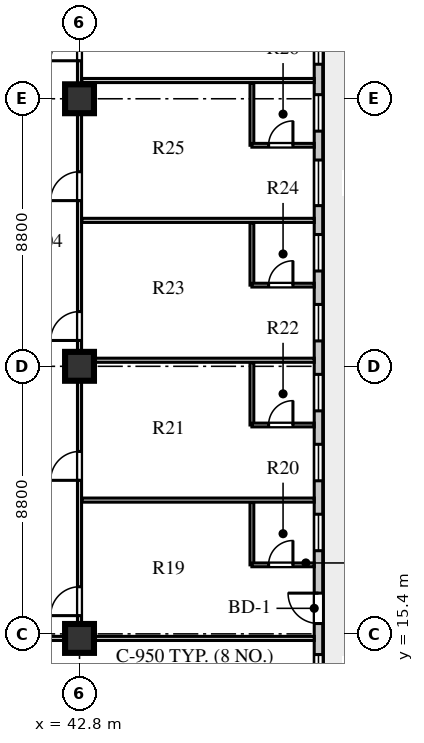
"""IFC4 building model, lengths in metres.
Left out: names, types, materials, properties, quantities, classifications, styles, units other than length and angle.
Written with IfcOpenShell. Run it as: python <this file> out.ifc"""

import sys

from ifc_helpers import new_model, si_unit, direction, frame, frame_2d, origin, origin_2d, place, context, subcontext, project, spatial, rectangle, extrude, element, fill, save


model = new_model("IFC4")
c1 = context("Model", 3, precision=1e-05, world=origin(), true_north=direction((0.0, 1.0)))
c2 = subcontext(c1, "Body", "Model", "MODEL_VIEW")
j1 = project(units=[si_unit("LENGTHUNIT", "METRE"), si_unit("PLANEANGLEUNIT", "RADIAN")], contexts=[c1])
p1 = place(None, origin())
s1 = spatial("IfcSite", under=j1, at=p1, CompositionType="ELEMENT")
p2 = place(p1, origin())
s2 = spatial("IfcBuilding", under=s1, at=p2, CompositionType="ELEMENT")
p3 = place(p2, frame((0.0, 0.0, 188.7)))
s3 = spatial("IfcBuildingStorey", under=s2, at=p3, CompositionType="ELEMENT", Elevation=188.7)
for number, where, z_axis, x_axis in (
    (1, (42.8, 15.25, 0.0), (0.0, 0.0, 1.0), (1.0, 0.0, 0.0)),
    (2, (42.8, 24.2, 0.0), (0.0, 0.0, 1.0), (1.0, 0.0, 0.0)),
    (3, (42.8, 33.0, 0.0), (0.0, 0.0, 1.0), (1.0, 0.0, 0.0)),
):
    element("IfcColumn", number, at=place(p3, frame(where, z_axis=z_axis, x_axis=x_axis)), inside=s3, PredefinedType="COLUMN", context=c2, shape_type="SweptSolid", body=[
        extrude(rectangle(XDim=0.95, YDim=0.95, at=origin_2d()), origin(), (0.0, 0.0, 1.0), 3.6),
    ])
p4 = place(p3, frame((50.66, 13.13, 0.0), z_axis=(0.0, 0.0, 1.0), x_axis=(0.0, 1.0, 0.0)))
e4 = element("IfcWall", 4, at=p4, inside=s3, PredefinedType="STANDARD", context=c2, shape_type="SweptSolid", body=[
    extrude(rectangle(XDim=30.94, YDim=0.28, at=frame_2d((15.47, 0.0))), origin(), (0.0, 0.0, 1.0), 3.6),
])
p5 = place(p4, frame((0.64, 0.0, 0.8)))
e5 = element("IfcOpeningElement", 5, at=p5, cuts=e4, PredefinedType="OPENING", context=c2, shape_type="SweptSolid", body=[
    extrude(rectangle(XDim=0.95, YDim=1.65, at=frame_2d((0.475, 0.825))), frame((0.0, 0.15, 0.0), z_axis=(0.0, -1.0, 0.0), x_axis=(1.0, 0.0, 0.0)), (0.0, 0.0, 1.0), 0.3),
])
p6 = place(p4, frame((2.61, 0.0, 0.0)))
e6 = element("IfcOpeningElement", 6, at=p6, cuts=e4, PredefinedType="OPENING", context=c2, shape_type="SweptSolid", body=[
    extrude(rectangle(XDim=1.0, YDim=2.05, at=frame_2d((0.5, 1.025))), frame((0.0, 0.15, 0.0), z_axis=(0.0, -1.0, 0.0), x_axis=(1.0, 0.0, 0.0)), (0.0, 0.0, 1.0), 0.3),
])
p7 = place(p4, frame((5.005, 0.0, 0.8)))
e7 = element("IfcOpeningElement", 7, at=p7, cuts=e4, PredefinedType="OPENING", context=c2, shape_type="SweptSolid", body=[
    extrude(rectangle(XDim=1.2, YDim=1.75, at=frame_2d((0.6, 0.875))), frame((0.0, 0.15, 0.0), z_axis=(0.0, -1.0, 0.0), x_axis=(1.0, 0.0, 0.0)), (0.0, 0.0, 1.0), 0.3),
])
p8 = place(p4, frame((7.305, 0.0, 0.8)))
e8 = element("IfcOpeningElement", 8, at=p8, cuts=e4, PredefinedType="OPENING", context=c2, shape_type="SweptSolid", body=[
    extrude(rectangle(XDim=1.2, YDim=1.75, at=frame_2d((0.6, 0.875))), frame((0.0, 0.15, 0.0), z_axis=(0.0, -1.0, 0.0), x_axis=(1.0, 0.0, 0.0)), (0.0, 0.0, 1.0), 0.3),
])
p9 = place(p4, frame((9.605, 0.0, 0.8)))
e9 = element("IfcOpeningElement", 9, at=p9, cuts=e4, PredefinedType="OPENING", context=c2, shape_type="SweptSolid", body=[
    extrude(rectangle(XDim=1.2, YDim=1.75, at=frame_2d((0.6, 0.875))), frame((0.0, 0.15, 0.0), z_axis=(0.0, -1.0, 0.0), x_axis=(1.0, 0.0, 0.0)), (0.0, 0.0, 1.0), 0.3),
])
p10 = place(p4, frame((11.905, 0.0, 0.8)))
e10 = element("IfcOpeningElement", 10, at=p10, cuts=e4, PredefinedType="OPENING", context=c2, shape_type="SweptSolid", body=[
    extrude(rectangle(XDim=1.2, YDim=1.75, at=frame_2d((0.6, 0.875))), frame((0.0, 0.15, 0.0), z_axis=(0.0, -1.0, 0.0), x_axis=(1.0, 0.0, 0.0)), (0.0, 0.0, 1.0), 0.3),
])
p11 = place(p4, frame((14.205, 0.0, 0.8)))
e11 = element("IfcOpeningElement", 11, at=p11, cuts=e4, PredefinedType="OPENING", context=c2, shape_type="SweptSolid", body=[
    extrude(rectangle(XDim=1.2, YDim=1.75, at=frame_2d((0.6, 0.875))), frame((0.0, 0.15, 0.0), z_axis=(0.0, -1.0, 0.0), x_axis=(1.0, 0.0, 0.0)), (0.0, 0.0, 1.0), 0.3),
])
p12 = place(p4, frame((16.355, 0.0, 0.8)))
e12 = element("IfcOpeningElement", 12, at=p12, cuts=e4, PredefinedType="OPENING", context=c2, shape_type="SweptSolid", body=[
    extrude(rectangle(XDim=1.5, YDim=2.0, at=frame_2d((0.75, 1.0))), frame((0.0, 0.15, 0.0), z_axis=(0.0, -1.0, 0.0), x_axis=(1.0, 0.0, 0.0)), (0.0, 0.0, 1.0), 0.3),
])
p13 = place(p4, frame((18.805, 0.0, 0.8)))
e13 = element("IfcOpeningElement", 13, at=p13, cuts=e4, PredefinedType="OPENING", context=c2, shape_type="SweptSolid", body=[
    extrude(rectangle(XDim=1.2, YDim=1.75, at=frame_2d((0.6, 0.875))), frame((0.0, 0.15, 0.0), z_axis=(0.0, -1.0, 0.0), x_axis=(1.0, 0.0, 0.0)), (0.0, 0.0, 1.0), 0.3),
])
p14 = place(p4, frame((21.005, 0.0, 0.8)))
e14 = element("IfcOpeningElement", 14, at=p14, cuts=e4, PredefinedType="OPENING", context=c2, shape_type="SweptSolid", body=[
    extrude(rectangle(XDim=1.2, YDim=1.75, at=frame_2d((0.6, 0.875))), frame((0.0, 0.15, 0.0), z_axis=(0.0, -1.0, 0.0), x_axis=(1.0, 0.0, 0.0)), (0.0, 0.0, 1.0), 0.3),
])
p15 = place(p4, frame((23.205, 0.0, 0.8)))
e15 = element("IfcOpeningElement", 15, at=p15, cuts=e4, PredefinedType="OPENING", context=c2, shape_type="SweptSolid", body=[
    extrude(rectangle(XDim=1.2, YDim=1.75, at=frame_2d((0.6, 0.875))), frame((0.0, 0.15, 0.0), z_axis=(0.0, -1.0, 0.0), x_axis=(1.0, 0.0, 0.0)), (0.0, 0.0, 1.0), 0.3),
])
p16 = place(p4, frame((27.105, 0.0, 0.8)))
e16 = element("IfcOpeningElement", 16, at=p16, cuts=e4, PredefinedType="OPENING", context=c2, shape_type="SweptSolid", body=[
    extrude(rectangle(XDim=1.2, YDim=1.75, at=frame_2d((0.6, 0.875))), frame((0.0, 0.15, 0.0), z_axis=(0.0, -1.0, 0.0), x_axis=(1.0, 0.0, 0.0)), (0.0, 0.0, 1.0), 0.3),
])
p17 = place(p4, frame((29.35, 0.0, 0.8)))
e17 = element("IfcOpeningElement", 17, at=p17, cuts=e4, PredefinedType="OPENING", context=c2, shape_type="SweptSolid", body=[
    extrude(rectangle(XDim=0.95, YDim=1.65, at=frame_2d((0.475, 0.825))), frame((0.0, 0.15, 0.0), z_axis=(0.0, -1.0, 0.0), x_axis=(1.0, 0.0, 0.0)), (0.0, 0.0, 1.0), 0.3),
])
p18 = place(p3, frame((42.8, 15.25, 0.0), z_axis=(0.0, 0.0, 1.0), x_axis=(0.0, 1.0, 0.0)))
e18 = element("IfcWall", 18, at=p18, inside=s3, PredefinedType="PARTITIONING", context=c2, shape_type="SweptSolid", body=[
    extrude(rectangle(XDim=26.7, YDim=0.135, at=frame_2d((13.35, 0.0))), origin(), (0.0, 0.0, 1.0), 2.95),
])
p19 = place(p18, frame((0.75, 0.0, 0.0)))
e19 = element("IfcOpeningElement", 19, at=p19, cuts=e18, PredefinedType="OPENING", context=c2, shape_type="SweptSolid", body=[
    extrude(rectangle(XDim=0.95, YDim=2.1, at=frame_2d((0.475, 1.05))), frame((0.0, 0.078, 0.0), z_axis=(0.0, -1.0, 0.0), x_axis=(1.0, 0.0, 0.0)), (0.0, 0.0, 1.0), 0.155),
])
p20 = place(p18, frame((5.2, 0.0, 0.0)))
e20 = element("IfcOpeningElement", 20, at=p20, cuts=e18, PredefinedType="OPENING", context=c2, shape_type="SweptSolid", body=[
    extrude(rectangle(XDim=0.95, YDim=2.1, at=frame_2d((0.475, 1.05))), frame((0.0, 0.078, 0.0), z_axis=(0.0, -1.0, 0.0), x_axis=(1.0, 0.0, 0.0)), (0.0, 0.0, 1.0), 0.155),
])
p21 = place(p18, frame((9.8, 0.0, 0.0)))
e21 = element("IfcOpeningElement", 21, at=p21, cuts=e18, PredefinedType="OPENING", context=c2, shape_type="SweptSolid", body=[
    extrude(rectangle(XDim=0.95, YDim=2.1, at=frame_2d((0.475, 1.05))), frame((0.0, 0.078, 0.0), z_axis=(0.0, -1.0, 0.0), x_axis=(1.0, 0.0, 0.0)), (0.0, 0.0, 1.0), 0.155),
])
p22 = place(p18, frame((14.4, 0.0, 0.0)))
e22 = element("IfcOpeningElement", 22, at=p22, cuts=e18, PredefinedType="OPENING", context=c2, shape_type="SweptSolid", body=[
    extrude(rectangle(XDim=0.95, YDim=2.1, at=frame_2d((0.475, 1.05))), frame((0.0, 0.078, 0.0), z_axis=(0.0, -1.0, 0.0), x_axis=(1.0, 0.0, 0.0)), (0.0, 0.0, 1.0), 0.155),
])
p23 = place(p18, frame((19.0, 0.0, 0.0)))
e23 = element("IfcOpeningElement", 23, at=p23, cuts=e18, PredefinedType="OPENING", context=c2, shape_type="SweptSolid", body=[
    extrude(rectangle(XDim=0.95, YDim=2.1, at=frame_2d((0.475, 1.05))), frame((0.0, 0.078, 0.0), z_axis=(0.0, -1.0, 0.0), x_axis=(1.0, 0.0, 0.0)), (0.0, 0.0, 1.0), 0.155),
])
p24 = place(p18, frame((23.4, 0.0, 0.0)))
e24 = element("IfcOpeningElement", 24, at=p24, cuts=e18, PredefinedType="OPENING", context=c2, shape_type="SweptSolid", body=[
    extrude(rectangle(XDim=0.95, YDim=2.1, at=frame_2d((0.475, 1.05))), frame((0.0, 0.078, 0.0), z_axis=(0.0, -1.0, 0.0), x_axis=(1.0, 0.0, 0.0)), (0.0, 0.0, 1.0), 0.155),
])
p25 = place(p3, frame((40.82, 15.25, 0.0), z_axis=(0.0, 0.0, 1.0), x_axis=(1.0, 0.0, 0.0)))
e25 = element("IfcWall", 25, at=p25, inside=s3, PredefinedType="PARTITIONING", context=c2, shape_type="SweptSolid", body=[
    extrude(rectangle(XDim=9.7, YDim=0.135, at=frame_2d((4.85, 0.0))), origin(), (0.0, 0.0, 1.0), 2.95),
])
p26 = place(p3, frame((48.47, 17.67, 0.0), z_axis=(0.0, 0.0, 1.0), x_axis=(0.0, 1.0, 0.0)))
e26 = element("IfcWall", 26, at=p26, inside=s3, PredefinedType="PLUMBINGWALL", context=c2, shape_type="SweptSolid", body=[
    extrude(rectangle(XDim=2.05, YDim=0.125, at=frame_2d((1.025, 0.0))), origin(), (0.0, 0.0, 1.0), 3.6),
])
p27 = place(p3, frame((48.47, 17.67, 0.0), z_axis=(0.0, 0.0, 1.0), x_axis=(1.0, 0.0, 0.0)))
e27 = element("IfcWall", 27, at=p27, inside=s3, PredefinedType="PLUMBINGWALL", context=c2, shape_type="SweptSolid", body=[
    extrude(rectangle(XDim=2.05, YDim=0.125, at=frame_2d((1.025, 0.0))), origin(), (0.0, 0.0, 1.0), 3.6),
])
p28 = place(p27, frame((0.55, 0.0, 0.0)))
e28 = element("IfcOpeningElement", 28, at=p28, cuts=e27, PredefinedType="OPENING", context=c2, shape_type="SweptSolid", body=[
    extrude(rectangle(XDim=0.8, YDim=2.05, at=frame_2d((0.4, 1.025))), frame((0.0, 0.073, 0.0), z_axis=(0.0, -1.0, 0.0), x_axis=(1.0, 0.0, 0.0)), (0.0, 0.0, 1.0), 0.145),
])
p29 = place(p3, frame((42.88, 19.8, 0.0), z_axis=(0.0, 0.0, 1.0), x_axis=(1.0, 0.0, 0.0)))
e29 = element("IfcWall", 29, at=p29, inside=s3, PredefinedType="PARTITIONING", context=c2, shape_type="SweptSolid", body=[
    extrude(rectangle(XDim=7.64, YDim=0.135, at=frame_2d((3.82, 0.0))), origin(), (0.0, 0.0, 1.0), 3.6),
])
p30 = place(p3, frame((48.47, 22.27, 0.0), z_axis=(0.0, 0.0, 1.0), x_axis=(0.0, 1.0, 0.0)))
e30 = element("IfcWall", 30, at=p30, inside=s3, PredefinedType="PLUMBINGWALL", context=c2, shape_type="SweptSolid", body=[
    extrude(rectangle(XDim=2.05, YDim=0.125, at=frame_2d((1.025, 0.0))), origin(), (0.0, 0.0, 1.0), 3.6),
])
p31 = place(p3, frame((48.47, 22.27, 0.0), z_axis=(0.0, 0.0, 1.0), x_axis=(1.0, 0.0, 0.0)))
e31 = element("IfcWall", 31, at=p31, inside=s3, PredefinedType="PLUMBINGWALL", context=c2, shape_type="SweptSolid", body=[
    extrude(rectangle(XDim=2.05, YDim=0.125, at=frame_2d((1.025, 0.0))), origin(), (0.0, 0.0, 1.0), 3.6),
])
p32 = place(p31, frame((0.55, 0.0, 0.0)))
e32 = element("IfcOpeningElement", 32, at=p32, cuts=e31, PredefinedType="OPENING", context=c2, shape_type="SweptSolid", body=[
    extrude(rectangle(XDim=0.8, YDim=2.05, at=frame_2d((0.4, 1.025))), frame((0.0, 0.073, 0.0), z_axis=(0.0, -1.0, 0.0), x_axis=(1.0, 0.0, 0.0)), (0.0, 0.0, 1.0), 0.145),
])
p33 = place(p3, frame((42.88, 24.4, 0.0), z_axis=(0.0, 0.0, 1.0), x_axis=(1.0, 0.0, 0.0)))
e33 = element("IfcWall", 33, at=p33, inside=s3, PredefinedType="PARTITIONING", context=c2, shape_type="SweptSolid", body=[
    extrude(rectangle(XDim=7.64, YDim=0.135, at=frame_2d((3.82, 0.0))), origin(), (0.0, 0.0, 1.0), 3.15),
])
p34 = place(p3, frame((48.47, 26.87, 0.0), z_axis=(0.0, 0.0, 1.0), x_axis=(0.0, 1.0, 0.0)))
e34 = element("IfcWall", 34, at=p34, inside=s3, PredefinedType="PLUMBINGWALL", context=c2, shape_type="SweptSolid", body=[
    extrude(rectangle(XDim=2.05, YDim=0.125, at=frame_2d((1.025, 0.0))), origin(), (0.0, 0.0, 1.0), 3.6),
])
p35 = place(p3, frame((48.47, 26.87, 0.0), z_axis=(0.0, 0.0, 1.0), x_axis=(1.0, 0.0, 0.0)))
e35 = element("IfcWall", 35, at=p35, inside=s3, PredefinedType="PLUMBINGWALL", context=c2, shape_type="SweptSolid", body=[
    extrude(rectangle(XDim=2.05, YDim=0.125, at=frame_2d((1.025, 0.0))), origin(), (0.0, 0.0, 1.0), 3.6),
])
p36 = place(p35, frame((0.55, 0.0, 0.0)))
e36 = element("IfcOpeningElement", 36, at=p36, cuts=e35, PredefinedType="OPENING", context=c2, shape_type="SweptSolid", body=[
    extrude(rectangle(XDim=0.8, YDim=2.05, at=frame_2d((0.4, 1.025))), frame((0.0, 0.073, 0.0), z_axis=(0.0, -1.0, 0.0), x_axis=(1.0, 0.0, 0.0)), (0.0, 0.0, 1.0), 0.145),
])
p37 = place(p3, frame((42.88, 29.0, 0.0), z_axis=(0.0, 0.0, 1.0), x_axis=(1.0, 0.0, 0.0)))
e37 = element("IfcWall", 37, at=p37, inside=s3, PredefinedType="PARTITIONING", context=c2, shape_type="SweptSolid", body=[
    extrude(rectangle(XDim=7.64, YDim=0.135, at=frame_2d((3.82, 0.0))), origin(), (0.0, 0.0, 1.0), 3.6),
])
p38 = place(p3, frame((48.47, 31.47, 0.0), z_axis=(0.0, 0.0, 1.0), x_axis=(0.0, 1.0, 0.0)))
e38 = element("IfcWall", 38, at=p38, inside=s3, PredefinedType="PLUMBINGWALL", context=c2, shape_type="SweptSolid", body=[
    extrude(rectangle(XDim=2.05, YDim=0.125, at=frame_2d((1.025, 0.0))), origin(), (0.0, 0.0, 1.0), 3.6),
])
p39 = place(p3, frame((48.47, 31.47, 0.0), z_axis=(0.0, 0.0, 1.0), x_axis=(1.0, 0.0, 0.0)))
e39 = element("IfcWall", 39, at=p39, inside=s3, PredefinedType="PLUMBINGWALL", context=c2, shape_type="SweptSolid", body=[
    extrude(rectangle(XDim=2.05, YDim=0.125, at=frame_2d((1.025, 0.0))), origin(), (0.0, 0.0, 1.0), 3.6),
])
p40 = place(p39, frame((0.55, 0.0, 0.0)))
e40 = element("IfcOpeningElement", 40, at=p40, cuts=e39, PredefinedType="OPENING", context=c2, shape_type="SweptSolid", body=[
    extrude(rectangle(XDim=0.8, YDim=2.05, at=frame_2d((0.4, 1.025))), frame((0.0, 0.073, 0.0), z_axis=(0.0, -1.0, 0.0), x_axis=(1.0, 0.0, 0.0)), (0.0, 0.0, 1.0), 0.145),
])
p41 = place(p3, frame((42.88, 33.6, 0.0), z_axis=(0.0, 0.0, 1.0), x_axis=(1.0, 0.0, 0.0)))
e41 = element("IfcWall", 41, at=p41, inside=s3, PredefinedType="PARTITIONING", context=c2, shape_type="SweptSolid", body=[
    extrude(rectangle(XDim=7.64, YDim=0.135, at=frame_2d((3.82, 0.0))), origin(), (0.0, 0.0, 1.0), 3.6),
])
p42 = place(p5, origin())
e42 = element("IfcWindow", 42, at=p42, inside=s3, PartitioningType="SINGLE_PANEL", PredefinedType="WINDOW", context=c2, shape_type="SweptSolid", body=[
    extrude(rectangle(XDim=0.95, YDim=1.65, at=frame_2d((0.475, 0.825))), frame((0.0, 0.03, 0.0), z_axis=(0.0, -1.0, 0.0), x_axis=(1.0, 0.0, 0.0)), (0.0, 0.0, 1.0), 0.06),
])
fill(e5, e42)
p43 = place(p6, frame((1.0, 0.0, 0.0), z_axis=(0.0, 0.0, 1.0), x_axis=(-1.0, 0.0, 0.0)))
e43 = element("IfcDoor", 43, at=p43, inside=s3, OperationType="SINGLE_SWING_LEFT", PredefinedType="DOOR", context=c2, shape_type="SweptSolid", body=[
    extrude(rectangle(XDim=1.0, YDim=2.05, at=frame_2d((0.5, 1.025))), frame((0.0, 0.025, 0.0), z_axis=(0.0, -1.0, 0.0), x_axis=(1.0, 0.0, 0.0)), (0.0, 0.0, 1.0), 0.05),
])
fill(e6, e43)
p44 = place(p7, origin())
e44 = element("IfcWindow", 44, at=p44, inside=s3, PartitioningType="SINGLE_PANEL", PredefinedType="WINDOW", context=c2, shape_type="SweptSolid", body=[
    extrude(rectangle(XDim=1.2, YDim=1.75, at=frame_2d((0.6, 0.875))), frame((0.0, 0.03, 0.0), z_axis=(0.0, -1.0, 0.0), x_axis=(1.0, 0.0, 0.0)), (0.0, 0.0, 1.0), 0.06),
])
fill(e7, e44)
p45 = place(p8, origin())
e45 = element("IfcWindow", 45, at=p45, inside=s3, PartitioningType="SINGLE_PANEL", PredefinedType="WINDOW", context=c2, shape_type="SweptSolid", body=[
    extrude(rectangle(XDim=1.2, YDim=1.75, at=frame_2d((0.6, 0.875))), frame((0.0, 0.03, 0.0), z_axis=(0.0, -1.0, 0.0), x_axis=(1.0, 0.0, 0.0)), (0.0, 0.0, 1.0), 0.06),
])
fill(e8, e45)
p46 = place(p9, origin())
e46 = element("IfcWindow", 46, at=p46, inside=s3, PartitioningType="SINGLE_PANEL", PredefinedType="WINDOW", context=c2, shape_type="SweptSolid", body=[
    extrude(rectangle(XDim=1.2, YDim=1.75, at=frame_2d((0.6, 0.875))), frame((0.0, 0.03, 0.0), z_axis=(0.0, -1.0, 0.0), x_axis=(1.0, 0.0, 0.0)), (0.0, 0.0, 1.0), 0.06),
])
fill(e9, e46)
p47 = place(p10, origin())
e47 = element("IfcWindow", 47, at=p47, inside=s3, PartitioningType="SINGLE_PANEL", PredefinedType="WINDOW", context=c2, shape_type="SweptSolid", body=[
    extrude(rectangle(XDim=1.2, YDim=1.75, at=frame_2d((0.6, 0.875))), frame((0.0, 0.03, 0.0), z_axis=(0.0, -1.0, 0.0), x_axis=(1.0, 0.0, 0.0)), (0.0, 0.0, 1.0), 0.06),
])
fill(e10, e47)
p48 = place(p11, origin())
e48 = element("IfcWindow", 48, at=p48, inside=s3, PartitioningType="SINGLE_PANEL", PredefinedType="WINDOW", context=c2, shape_type="SweptSolid", body=[
    extrude(rectangle(XDim=1.2, YDim=1.75, at=frame_2d((0.6, 0.875))), frame((0.0, 0.03, 0.0), z_axis=(0.0, -1.0, 0.0), x_axis=(1.0, 0.0, 0.0)), (0.0, 0.0, 1.0), 0.06),
])
fill(e11, e48)
p49 = place(p12, origin())
e49 = element("IfcWindow", 49, at=p49, inside=s3, PartitioningType="SINGLE_PANEL", PredefinedType="WINDOW", context=c2, shape_type="SweptSolid", body=[
    extrude(rectangle(XDim=1.5, YDim=2.0, at=frame_2d((0.75, 1.0))), frame((0.0, 0.03, 0.0), z_axis=(0.0, -1.0, 0.0), x_axis=(1.0, 0.0, 0.0)), (0.0, 0.0, 1.0), 0.06),
])
fill(e12, e49)
p50 = place(p13, origin())
e50 = element("IfcWindow", 50, at=p50, inside=s3, PartitioningType="SINGLE_PANEL", PredefinedType="WINDOW", context=c2, shape_type="SweptSolid", body=[
    extrude(rectangle(XDim=1.2, YDim=1.75, at=frame_2d((0.6, 0.875))), frame((0.0, 0.03, 0.0), z_axis=(0.0, -1.0, 0.0), x_axis=(1.0, 0.0, 0.0)), (0.0, 0.0, 1.0), 0.06),
])
fill(e13, e50)
p51 = place(p14, origin())
e51 = element("IfcWindow", 51, at=p51, inside=s3, PartitioningType="SINGLE_PANEL", PredefinedType="WINDOW", context=c2, shape_type="SweptSolid", body=[
    extrude(rectangle(XDim=1.2, YDim=1.75, at=frame_2d((0.6, 0.875))), frame((0.0, 0.03, 0.0), z_axis=(0.0, -1.0, 0.0), x_axis=(1.0, 0.0, 0.0)), (0.0, 0.0, 1.0), 0.06),
])
fill(e14, e51)
p52 = place(p19, origin())
e52 = element("IfcDoor", 52, at=p52, inside=s3, OperationType="SINGLE_SWING_LEFT", PredefinedType="DOOR", context=c2, shape_type="SweptSolid", body=[
    extrude(rectangle(XDim=0.95, YDim=2.1, at=frame_2d((0.475, 1.05))), frame((0.0, 0.025, 0.0), z_axis=(0.0, -1.0, 0.0), x_axis=(1.0, 0.0, 0.0)), (0.0, 0.0, 1.0), 0.05),
])
fill(e19, e52)
p53 = place(p28, frame((0.8, 0.0, 0.0), z_axis=(0.0, 0.0, 1.0), x_axis=(-1.0, 0.0, 0.0)))
e53 = element("IfcDoor", 53, at=p53, inside=s3, OperationType="SINGLE_SWING_LEFT", PredefinedType="DOOR", context=c2, shape_type="SweptSolid", body=[
    extrude(rectangle(XDim=0.8, YDim=2.05, at=frame_2d((0.4, 1.025))), frame((0.0, 0.025, 0.0), z_axis=(0.0, -1.0, 0.0), x_axis=(1.0, 0.0, 0.0)), (0.0, 0.0, 1.0), 0.05),
])
fill(e28, e53)
p54 = place(p20, origin())
e54 = element("IfcDoor", 54, at=p54, inside=s3, OperationType="SINGLE_SWING_LEFT", PredefinedType="DOOR", context=c2, shape_type="SweptSolid", body=[
    extrude(rectangle(XDim=0.95, YDim=2.1, at=frame_2d((0.475, 1.05))), frame((0.0, 0.025, 0.0), z_axis=(0.0, -1.0, 0.0), x_axis=(1.0, 0.0, 0.0)), (0.0, 0.0, 1.0), 0.05),
])
fill(e20, e54)
p55 = place(p32, frame((0.8, 0.0, 0.0), z_axis=(0.0, 0.0, 1.0), x_axis=(-1.0, 0.0, 0.0)))
e55 = element("IfcDoor", 55, at=p55, inside=s3, OperationType="SINGLE_SWING_LEFT", PredefinedType="DOOR", context=c2, shape_type="SweptSolid", body=[
    extrude(rectangle(XDim=0.8, YDim=2.05, at=frame_2d((0.4, 1.025))), frame((0.0, 0.025, 0.0), z_axis=(0.0, -1.0, 0.0), x_axis=(1.0, 0.0, 0.0)), (0.0, 0.0, 1.0), 0.05),
])
fill(e32, e55)
p56 = place(p21, origin())
e56 = element("IfcDoor", 56, at=p56, inside=s3, OperationType="SINGLE_SWING_LEFT", PredefinedType="DOOR", context=c2, shape_type="SweptSolid", body=[
    extrude(rectangle(XDim=0.95, YDim=2.1, at=frame_2d((0.475, 1.05))), frame((0.0, 0.025, 0.0), z_axis=(0.0, -1.0, 0.0), x_axis=(1.0, 0.0, 0.0)), (0.0, 0.0, 1.0), 0.05),
])
fill(e21, e56)
p57 = place(p36, frame((0.8, 0.0, 0.0), z_axis=(0.0, 0.0, 1.0), x_axis=(-1.0, 0.0, 0.0)))
e57 = element("IfcDoor", 57, at=p57, inside=s3, OperationType="SINGLE_SWING_LEFT", PredefinedType="DOOR", context=c2, shape_type="SweptSolid", body=[
    extrude(rectangle(XDim=0.8, YDim=2.05, at=frame_2d((0.4, 1.025))), frame((0.0, 0.025, 0.0), z_axis=(0.0, -1.0, 0.0), x_axis=(1.0, 0.0, 0.0)), (0.0, 0.0, 1.0), 0.05),
])
fill(e36, e57)
p58 = place(p22, origin())
e58 = element("IfcDoor", 58, at=p58, inside=s3, OperationType="SINGLE_SWING_LEFT", PredefinedType="DOOR", context=c2, shape_type="SweptSolid", body=[
    extrude(rectangle(XDim=0.95, YDim=2.1, at=frame_2d((0.475, 1.05))), frame((0.0, 0.025, 0.0), z_axis=(0.0, -1.0, 0.0), x_axis=(1.0, 0.0, 0.0)), (0.0, 0.0, 1.0), 0.05),
])
fill(e22, e58)
p59 = place(p40, frame((0.8, 0.0, 0.0), z_axis=(0.0, 0.0, 1.0), x_axis=(-1.0, 0.0, 0.0)))
e59 = element("IfcDoor", 59, at=p59, inside=s3, OperationType="SINGLE_SWING_LEFT", PredefinedType="DOOR", context=c2, shape_type="SweptSolid", body=[
    extrude(rectangle(XDim=0.8, YDim=2.05, at=frame_2d((0.4, 1.025))), frame((0.0, 0.025, 0.0), z_axis=(0.0, -1.0, 0.0), x_axis=(1.0, 0.0, 0.0)), (0.0, 0.0, 1.0), 0.05),
])
fill(e40, e59)
p60 = place(p23, origin())
e60 = element("IfcDoor", 60, at=p60, inside=s3, OperationType="SINGLE_SWING_LEFT", PredefinedType="DOOR", context=c2, shape_type="SweptSolid", body=[
    extrude(rectangle(XDim=0.95, YDim=2.1, at=frame_2d((0.475, 1.05))), frame((0.0, 0.025, 0.0), z_axis=(0.0, -1.0, 0.0), x_axis=(1.0, 0.0, 0.0)), (0.0, 0.0, 1.0), 0.05),
])
fill(e23, e60)
save(model, sys.argv[1])
